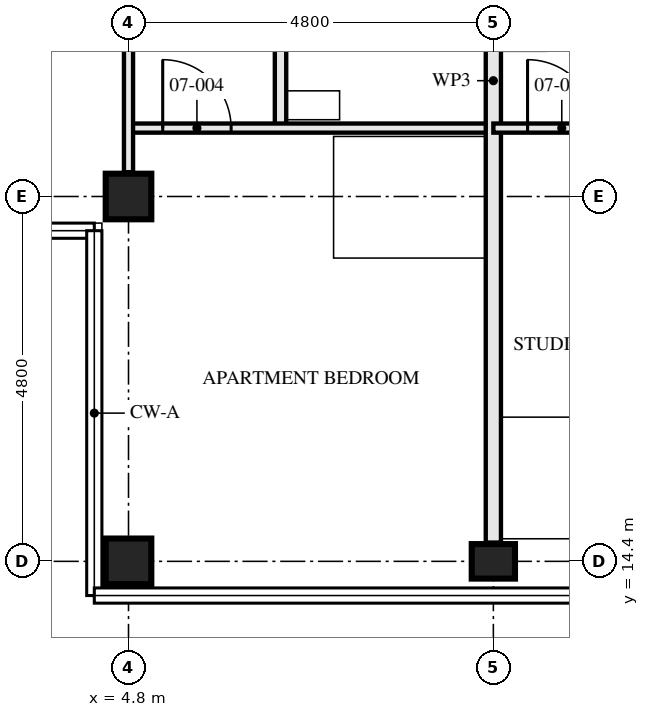
"""IFC4 building model, lengths in metres.
Left out: names, types, materials, properties, quantities, classifications, styles, units other than length and angle.
Written with IfcOpenShell. Run it as: python <this file> out.ifc"""

import sys

from ifc_helpers import new_model, si_unit, direction, frame, frame_2d, origin, origin_2d, place, context, subcontext, project, spatial, rectangle, hollow_rectangle, i_section, extrude, element, fill, save


model = new_model("IFC4")
c1 = context("Model", 3, precision=1e-05, world=origin(), true_north=direction((0.0, 1.0)))
c2 = subcontext(c1, "Body", "Model", "MODEL_VIEW")
j1 = project(units=[si_unit("LENGTHUNIT", "METRE"), si_unit("PLANEANGLEUNIT", "RADIAN")], contexts=[c1])
p1 = place(None, origin())
s1 = spatial("IfcSite", under=j1, at=p1, CompositionType="ELEMENT")
p2 = place(p1, origin())
s2 = spatial("IfcBuilding", under=s1, at=p2, CompositionType="ELEMENT")
p3 = place(p2, frame((0.0, 0.0, 30.5)))
s3 = spatial("IfcBuildingStorey", under=s2, at=p3, CompositionType="ELEMENT", Elevation=30.5)
for number, where, z_axis, x_axis in (
    (1, (4.8, 14.4, 0.0), (0.0, 0.0, 1.0), (0.0, 1.0, 0.0)),
    (2, (4.8, 19.2, 0.0), (0.0, 0.0, 1.0), (0.0, 1.0, 0.0)),
):
    element("IfcColumn", number, at=place(p3, frame(where, z_axis=z_axis, x_axis=x_axis)), inside=s3, PredefinedType="COLUMN", context=c2, shape_type="SweptSolid", body=[
        extrude(hollow_rectangle(XDim=0.6, YDim=0.6, WallThickness=0.05, at=origin_2d()), origin(), (0.0, 0.0, 1.0), 3.5),
    ])
p4 = place(p3, frame((9.6, 14.4, 0.0), z_axis=(0.0, 0.0, 1.0), x_axis=(0.0, 1.0, 0.0)))
e3 = element("IfcColumn", 3, at=p4, inside=s3, PredefinedType="COLUMN", context=c2, shape_type="SweptSolid", body=[
    extrude(i_section(OverallWidth=0.454, OverallDepth=0.569, WebThickness=0.078, FlangeThickness=0.125, FilletRadius=0.015, at=origin_2d()), origin(), (0.0, 0.0, 1.0), 3.5),
])
p5 = place(p3, frame((6.8, 20.1, 0.0), z_axis=(0.0, 0.0, 1.0), x_axis=(0.0, 1.0, 0.0)))
e4 = element("IfcWall", 4, at=p5, inside=s3, PredefinedType="PARTITIONING", context=c2, shape_type="SweptSolid", body=[
    extrude(rectangle(XDim=3.0, YDim=0.15, at=frame_2d((1.5, 0.0))), origin(), (0.0, 0.0, 1.0), 3.33),
])
p6 = place(p5, frame((1.05, 0.0, 0.0)))
e5 = element("IfcOpeningElement", 5, at=p6, cuts=e4, PredefinedType="OPENING", context=c2, shape_type="SweptSolid", body=[
    extrude(rectangle(XDim=0.9, YDim=2.1, at=frame_2d((0.45, 1.05))), frame((0.0, 0.085, 0.0), z_axis=(0.0, -1.0, 0.0), x_axis=(1.0, 0.0, 0.0)), (0.0, 0.0, 1.0), 0.171),
])
p7 = place(p3, frame((4.8, 20.1, 0.0), z_axis=(0.0, 0.0, 1.0), x_axis=(1.0, 0.0, 0.0)))
e6 = element("IfcWall", 6, at=p7, inside=s3, PredefinedType="PARTITIONING", context=c2, shape_type="SweptSolid", body=[
    extrude(rectangle(XDim=4.8, YDim=0.12, at=frame_2d((2.4, 0.0))), origin(), (0.0, 0.0, 1.0), 3.33),
])
p8 = place(p7, frame((0.45, 0.0, 0.0)))
e7 = element("IfcOpeningElement", 7, at=p8, cuts=e6, PredefinedType="OPENING", context=c2, shape_type="SweptSolid", body=[
    extrude(rectangle(XDim=0.9, YDim=2.1, at=frame_2d((0.45, 1.05))), frame((0.0, 0.071, 0.0), z_axis=(0.0, -1.0, 0.0), x_axis=(1.0, 0.0, 0.0)), (0.0, 0.0, 1.0), 0.141),
])
p9 = place(p3, frame((4.8, 19.52, 0.0), z_axis=(0.0, 0.0, 1.0), x_axis=(0.0, 1.0, 0.0)))
e8 = element("IfcWall", 8, at=p9, inside=s3, PredefinedType="PARTITIONING", context=c2, shape_type="SweptSolid", body=[
    extrude(rectangle(XDim=4.28, YDim=0.12, at=frame_2d((2.14, 0.0))), origin(), (0.0, 0.0, 1.0), 3.33),
])
p10 = place(p3, frame((9.6, 14.647, 0.0), z_axis=(0.0, 0.0, 1.0), x_axis=(0.0, 1.0, 0.0)))
e9 = element("IfcWall", 9, at=p10, inside=s3, PredefinedType="PARTITIONING", context=c2, shape_type="SweptSolid", body=[
    extrude(rectangle(XDim=12.153, YDim=0.2, at=frame_2d((6.077, 0.0))), origin(), (0.0, 0.0, 1.0), 2.55),
])
p11 = place(p3, frame((9.6, 20.1, 0.0), z_axis=(0.0, 0.0, 1.0), x_axis=(1.0, 0.0, 0.0)))
e10 = element("IfcWall", 10, at=p11, inside=s3, PredefinedType="PARTITIONING", context=c2, shape_type="SweptSolid", body=[
    extrude(rectangle(XDim=4.8, YDim=0.12, at=frame_2d((2.4, 0.0))), origin(), (0.0, 0.0, 1.0), 3.33),
])
p12 = place(p11, frame((0.45, 0.0, 0.0)))
e11 = element("IfcOpeningElement", 11, at=p12, cuts=e10, PredefinedType="OPENING", context=c2, shape_type="SweptSolid", body=[
    extrude(rectangle(XDim=0.9, YDim=2.1, at=frame_2d((0.45, 1.05))), frame((0.0, 0.071, 0.0), z_axis=(0.0, -1.0, 0.0), x_axis=(1.0, 0.0, 0.0)), (0.0, 0.0, 1.0), 0.141),
])
p13 = place(p8, origin())
e12 = element("IfcDoor", 12, at=p13, inside=s3, OperationType="SINGLE_SWING_RIGHT", PredefinedType="DOOR", context=c2, shape_type="SweptSolid", body=[
    extrude(rectangle(XDim=0.9, YDim=2.1, at=frame_2d((0.45, 1.05))), frame((0.0, 0.022, 0.0), z_axis=(0.0, -1.0, 0.0), x_axis=(1.0, 0.0, 0.0)), (0.0, 0.0, 1.0), 0.044),
])
fill(e7, e12)
p14 = place(p12, origin())
e13 = element("IfcDoor", 13, at=p14, inside=s3, OperationType="SINGLE_SWING_RIGHT", PredefinedType="DOOR", context=c2, shape_type="SweptSolid", body=[
    extrude(rectangle(XDim=0.9, YDim=2.1, at=frame_2d((0.45, 1.05))), frame((0.0, 0.022, 0.0), z_axis=(0.0, -1.0, 0.0), x_axis=(1.0, 0.0, 0.0)), (0.0, 0.0, 1.0), 0.044),
])
fill(e11, e13)
save(model, sys.argv[1])
